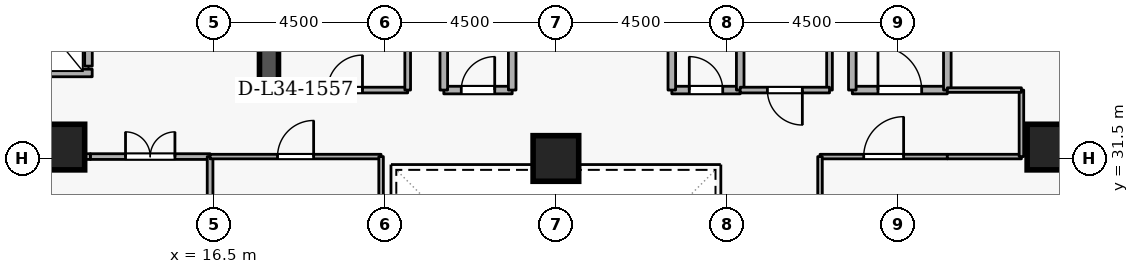
"""IFC4 building model, lengths in metres.
Left out: names, types, materials, properties, quantities, classifications, styles, units other than length and angle.
Written with IfcOpenShell. Run it as: python <this file> out.ifc"""

import sys

from ifc_helpers import new_model, si_unit, direction, frame, frame_2d, origin, origin_2d, place, context, subcontext, project, spatial, rectangle, extrude, element, fill, save


model = new_model("IFC4")
c1 = context("Model", 3, precision=1e-05, world=origin(), true_north=direction((0.0, 1.0)))
c2 = subcontext(c1, "Body", "Model", "MODEL_VIEW")
j1 = project(units=[si_unit("LENGTHUNIT", "METRE"), si_unit("PLANEANGLEUNIT", "RADIAN")], contexts=[c1])
p1 = place(None, origin())
s1 = spatial("IfcSite", under=j1, at=p1, CompositionType="ELEMENT")
p2 = place(p1, origin())
s2 = spatial("IfcBuilding", under=s1, at=p2, CompositionType="ELEMENT")
p3 = place(p2, frame((0.0, 0.0, 130.5)))
s3 = spatial("IfcBuildingStorey", under=s2, at=p3, CompositionType="ELEMENT", Elevation=130.5)
p4 = place(p3, frame((17.95, 33.1, 0.0), z_axis=(0.0, 0.0, 1.0), x_axis=(0.0, 1.0, 0.0)))
e1 = element("IfcWall", 1, at=p4, inside=s3, PredefinedType="SHEAR", context=c2, shape_type="SweptSolid", body=[
    extrude(rectangle(XDim=5.8, YDim=0.5, at=frame_2d((2.9, 0.0))), origin(), (0.0, 0.0, 1.0), 3.6),
])
for number, where, z_axis, x_axis in (
    (2, (12.5, 31.8, 0.0), (0.0, 0.0, 1.0), (1.0, 0.0, 0.0)),
    (3, (38.5, 31.8, 0.0), (0.0, 0.0, 1.0), (1.0, 0.0, 0.0)),
    (4, (25.5, 31.5, 0.0), (0.0, 0.0, 1.0), (1.0, 0.0, 0.0)),
):
    element("IfcColumn", number, at=place(p3, frame(where, z_axis=z_axis, x_axis=x_axis)), inside=s3, PredefinedType="COLUMN", context=c2, shape_type="SweptSolid", body=[
        extrude(rectangle(XDim=1.2, YDim=1.2, at=origin_2d()), origin(), (0.0, 0.0, 1.0), 3.6),
    ])
p5 = place(p3, frame((13.2, 33.93, 0.0), z_axis=(0.0, 0.0, 1.0), x_axis=(0.0, 1.0, 0.0)))
e5 = element("IfcWall", 5, at=p5, inside=s3, PredefinedType="STANDARD", context=c2, shape_type="SweptSolid", body=[
    extrude(rectangle(XDim=1.94, YDim=0.2, at=frame_2d((0.97, 0.0))), origin(), (0.0, 0.0, 1.0), 3.34),
])
p6 = place(p5, frame((0.46, 0.0, 0.0)))
e6 = element("IfcOpeningElement", 6, at=p6, cuts=e5, PredefinedType="OPENING", context=c2, shape_type="SweptSolid", body=[
    extrude(rectangle(XDim=1.02, YDim=2.06, at=frame_2d((0.51, 1.03))), frame((0.0, 0.11, 0.0), z_axis=(0.0, -1.0, 0.0), x_axis=(1.0, 0.0, 0.0)), (0.0, 0.0, 1.0), 0.22),
])
p7 = place(p3, frame((11.002, 33.75, 0.0), z_axis=(0.0, 0.0, 1.0), x_axis=(1.0, 0.0, 0.0)))
e7 = element("IfcWall", 7, at=p7, inside=s3, PredefinedType="STANDARD", context=c2, shape_type="SweptSolid", body=[
    extrude(rectangle(XDim=2.296, YDim=0.2, at=frame_2d((1.148, 0.0))), origin(), (0.0, 0.0, 1.0), 3.34),
])
p8 = place(p3, frame((33.3, 33.3, 0.0), z_axis=(0.0, 0.0, 1.0), x_axis=(1.0, 0.0, 0.0)))
e8 = element("IfcWall", 8, at=p8, inside=s3, PredefinedType="STANDARD", context=c2, shape_type="SweptSolid", body=[
    extrude(rectangle(XDim=2.5, YDim=0.2, at=frame_2d((1.25, 0.0))), origin(), (0.0, 0.0, 1.0), 3.34),
])
p9 = place(p8, frame((0.675, 0.0, 0.0)))
e9 = element("IfcOpeningElement", 9, at=p9, cuts=e8, PredefinedType="OPENING", context=c2, shape_type="SweptSolid", body=[
    extrude(rectangle(XDim=1.15, YDim=2.1, at=frame_2d((0.575, 1.05))), frame((0.0, 0.11, 0.0), z_axis=(0.0, -1.0, 0.0), x_axis=(1.0, 0.0, 0.0)), (0.0, 0.0, 1.0), 0.22),
])
p10 = place(p3, frame((35.8, 33.3, 0.0), z_axis=(0.0, 0.0, 1.0), x_axis=(0.0, 1.0, 0.0)))
e10 = element("IfcWall", 10, at=p10, inside=s3, PredefinedType="STANDARD", context=c2, shape_type="SweptSolid", body=[
    extrude(rectangle(XDim=5.7, YDim=0.2, at=frame_2d((2.85, 0.0))), origin(), (0.0, 0.0, 1.0), 3.34),
])
p11 = place(p3, frame((33.3, 35.6, 0.0), z_axis=(0.0, 0.0, 1.0), x_axis=(0.0, -1.0, 0.0)))
e11 = element("IfcWall", 11, at=p11, inside=s3, PredefinedType="STANDARD", context=c2, shape_type="SweptSolid", body=[
    extrude(rectangle(XDim=2.3, YDim=0.2, at=frame_2d((1.15, 0.0))), origin(), (0.0, 0.0, 1.0), 2.545),
])
p12 = place(p3, frame((22.55, 33.3, 0.0), z_axis=(0.0, 0.0, 1.0), x_axis=(1.0, 0.0, 0.0)))
e12 = element("IfcWall", 12, at=p12, inside=s3, PredefinedType="STANDARD", context=c2, shape_type="SweptSolid", body=[
    extrude(rectangle(XDim=1.8, YDim=0.2, at=frame_2d((0.9, 0.0))), origin(), (0.0, 0.0, 1.0), 3.34),
])
p13 = place(p12, frame((0.46, 0.0, 0.0)))
e13 = element("IfcOpeningElement", 13, at=p13, cuts=e12, PredefinedType="OPENING", context=c2, shape_type="SweptSolid", body=[
    extrude(rectangle(XDim=0.88, YDim=2.04, at=frame_2d((0.44, 1.02))), frame((0.0, 0.11, 0.0), z_axis=(0.0, -1.0, 0.0), x_axis=(1.0, 0.0, 0.0)), (0.0, 0.0, 1.0), 0.22),
])
for number, where, z_axis, x_axis in (
    (14, (24.35, 33.3, 0.0), (0.0, 0.0, 1.0), (0.0, 1.0, 0.0)),
    (15, (22.55, 35.35, 0.0), (0.0, 0.0, 1.0), (0.0, -1.0, 0.0)),
):
    element("IfcWall", number, at=place(p3, frame(where, z_axis=z_axis, x_axis=x_axis)), inside=s3, PredefinedType="STANDARD", context=c2, shape_type="SweptSolid", body=[
        extrude(rectangle(XDim=2.05, YDim=0.2, at=frame_2d((1.025, 0.0))), origin(), (0.0, 0.0, 1.0), 3.34),
    ])
p14 = place(p3, frame((28.55, 33.3, 0.0), z_axis=(0.0, 0.0, 1.0), x_axis=(1.0, 0.0, 0.0)))
e16 = element("IfcWall", 16, at=p14, inside=s3, PredefinedType="STANDARD", context=c2, shape_type="SweptSolid", body=[
    extrude(rectangle(XDim=1.8, YDim=0.2, at=frame_2d((0.9, 0.0))), origin(), (0.0, 0.0, 1.0), 3.34),
])
p15 = place(p14, frame((0.46, 0.0, 0.0)))
e17 = element("IfcOpeningElement", 17, at=p15, cuts=e16, PredefinedType="OPENING", context=c2, shape_type="SweptSolid", body=[
    extrude(rectangle(XDim=0.88, YDim=2.04, at=frame_2d((0.44, 1.02))), frame((0.0, 0.11, 0.0), z_axis=(0.0, -1.0, 0.0), x_axis=(1.0, 0.0, 0.0)), (0.0, 0.0, 1.0), 0.22),
])
for number, where, z_axis, x_axis in (
    (18, (30.35, 33.3, 0.0), (0.0, 0.0, 1.0), (0.0, 1.0, 0.0)),
    (19, (28.55, 35.35, 0.0), (0.0, 0.0, 1.0), (0.0, -1.0, 0.0)),
):
    element("IfcWall", number, at=place(p3, frame(where, z_axis=z_axis, x_axis=x_axis)), inside=s3, PredefinedType="STANDARD", context=c2, shape_type="SweptSolid", body=[
        extrude(rectangle(XDim=2.05, YDim=0.2, at=frame_2d((1.025, 0.0))), origin(), (0.0, 0.0, 1.0), 3.34),
    ])
p16 = place(p3, frame((18.3, 33.3, 0.0), z_axis=(0.0, 0.0, 1.0), x_axis=(1.0, 0.0, 0.0)))
e20 = element("IfcWall", 20, at=p16, inside=s3, PredefinedType="PARTITIONING", context=c2, shape_type="SweptSolid", body=[
    extrude(rectangle(XDim=3.3, YDim=0.15, at=frame_2d((1.65, 0.0))), origin(), (0.0, 0.0, 1.0), 3.34),
])
p17 = place(p16, frame((1.19, 0.0, 0.0)))
e21 = element("IfcOpeningElement", 21, at=p17, cuts=e20, PredefinedType="OPENING", context=c2, shape_type="SweptSolid", body=[
    extrude(rectangle(XDim=0.92, YDim=2.08, at=frame_2d((0.46, 1.04))), frame((0.0, 0.085, 0.0), z_axis=(0.0, -1.0, 0.0), x_axis=(1.0, 0.0, 0.0)), (0.0, 0.0, 1.0), 0.17),
])
p18 = place(p3, frame((21.6, 33.3, 0.0), z_axis=(0.0, 0.0, 1.0), x_axis=(0.0, 1.0, 0.0)))
e22 = element("IfcWall", 22, at=p18, inside=s3, PredefinedType="PARTITIONING", context=c2, shape_type="SweptSolid", body=[
    extrude(rectangle(XDim=2.05, YDim=0.15, at=frame_2d((1.025, 0.0))), origin(), (0.0, 0.0, 1.0), 3.34),
])
p19 = place(p3, frame((32.7, 35.35, 0.0), z_axis=(0.0, 0.0, 1.0), x_axis=(0.0, -1.0, 0.0)))
e23 = element("IfcWall", 23, at=p19, inside=s3, PredefinedType="PARTITIONING", context=c2, shape_type="SweptSolid", body=[
    extrude(rectangle(XDim=2.05, YDim=0.15, at=frame_2d((1.025, 0.0))), origin(), (0.0, 0.0, 1.0), 2.545),
])
p20 = place(p3, frame((32.7, 33.3, 0.0), z_axis=(0.0, 0.0, 1.0), x_axis=(-1.0, 0.0, 0.0)))
e24 = element("IfcWall", 24, at=p20, inside=s3, PredefinedType="PARTITIONING", context=c2, shape_type="SweptSolid", body=[
    extrude(rectangle(XDim=2.35, YDim=0.15, at=frame_2d((1.175, 0.0))), origin(), (0.0, 0.0, 1.0), 3.34),
])
p21 = place(p20, frame((0.715, 0.0, 0.0)))
e25 = element("IfcOpeningElement", 25, at=p21, cuts=e24, PredefinedType="OPENING", context=c2, shape_type="SweptSolid", body=[
    extrude(rectangle(XDim=0.92, YDim=2.08, at=frame_2d((0.46, 1.04))), frame((0.0, 0.085, 0.0), z_axis=(0.0, -1.0, 0.0), x_axis=(1.0, 0.0, 0.0)), (0.0, 0.0, 1.0), 0.17),
])
p22 = place(p3, frame((13.25, 31.55, 0.0), z_axis=(0.0, 0.0, 1.0), x_axis=(1.0, 0.0, 0.0)))
e26 = element("IfcWall", 26, at=p22, inside=s3, PredefinedType="PARTITIONING", context=c2, shape_type="SweptSolid", body=[
    extrude(rectangle(XDim=3.15, YDim=0.15, at=frame_2d((1.575, 0.0))), origin(), (0.0, 0.0, 1.0), 3.34),
])
p23 = place(p22, frame((0.925, 0.0, 0.0)))
e27 = element("IfcOpeningElement", 27, at=p23, cuts=e26, PredefinedType="OPENING", context=c2, shape_type="SweptSolid", body=[
    extrude(rectangle(XDim=1.3, YDim=2.12, at=frame_2d((0.65, 1.06))), frame((0.0, 0.085, 0.0), z_axis=(0.0, -1.0, 0.0), x_axis=(1.0, 0.0, 0.0)), (0.0, 0.0, 1.0), 0.17),
])
p24 = place(p3, frame((16.4, 31.55, 0.0), z_axis=(0.0, 0.0, 1.0), x_axis=(0.0, -1.0, 0.0)))
e28 = element("IfcWall", 28, at=p24, inside=s3, PredefinedType="PARTITIONING", context=c2, shape_type="SweptSolid", body=[
    extrude(rectangle(XDim=4.55, YDim=0.15, at=frame_2d((2.275, 0.0))), origin(), (0.0, 0.0, 1.0), 3.34),
])
p25 = place(p3, frame((10.9, 31.55, 0.0), z_axis=(0.0, 0.0, 1.0), x_axis=(1.0, 0.0, 0.0)))
e29 = element("IfcWall", 29, at=p25, inside=s3, PredefinedType="PARTITIONING", context=c2, shape_type="SweptSolid", body=[
    extrude(rectangle(XDim=2.35, YDim=0.15, at=frame_2d((1.175, 0.0))), origin(), (0.0, 0.0, 1.0), 3.34),
])
p26 = place(p3, frame((16.4, 31.55, 0.0), z_axis=(0.0, 0.0, 1.0), x_axis=(1.0, 0.0, 0.0)))
e30 = element("IfcWall", 30, at=p26, inside=s3, PredefinedType="PARTITIONING", context=c2, shape_type="SweptSolid", body=[
    extrude(rectangle(XDim=4.5, YDim=0.12, at=frame_2d((2.25, 0.0))), origin(), (0.0, 0.0, 1.0), 3.34),
])
p27 = place(p26, frame((1.775, 0.0, 0.0)))
e31 = element("IfcOpeningElement", 31, at=p27, cuts=e30, PredefinedType="OPENING", context=c2, shape_type="SweptSolid", body=[
    extrude(rectangle(XDim=0.95, YDim=2.1, at=frame_2d((0.475, 1.05))), frame((0.0, 0.07, 0.0), z_axis=(0.0, -1.0, 0.0), x_axis=(1.0, 0.0, 0.0)), (0.0, 0.0, 1.0), 0.14),
])
p28 = place(p3, frame((20.9, 31.55, 0.0), z_axis=(0.0, 0.0, 1.0), x_axis=(0.0, -1.0, 0.0)))
e32 = element("IfcWall", 32, at=p28, inside=s3, PredefinedType="PARTITIONING", context=c2, shape_type="SweptSolid", body=[
    extrude(rectangle(XDim=9.1, YDim=0.12, at=frame_2d((4.55, 0.0))), origin(), (0.0, 0.0, 1.0), 3.34),
])
p29 = place(p3, frame((32.45, 31.55, 0.0), z_axis=(0.0, 0.0, 1.0), x_axis=(1.0, 0.0, 0.0)))
e33 = element("IfcWall", 33, at=p29, inside=s3, PredefinedType="PARTITIONING", context=c2, shape_type="SweptSolid", body=[
    extrude(rectangle(XDim=3.35, YDim=0.12, at=frame_2d((1.675, 0.0))), origin(), (0.0, 0.0, 1.0), 3.34),
])
p30 = place(p29, frame((1.15, 0.0, 0.0)))
e34 = element("IfcOpeningElement", 34, at=p30, cuts=e33, PredefinedType="OPENING", context=c2, shape_type="SweptSolid", body=[
    extrude(rectangle(XDim=1.05, YDim=2.1, at=frame_2d((0.525, 1.05))), frame((0.0, 0.07, 0.0), z_axis=(0.0, -1.0, 0.0), x_axis=(1.0, 0.0, 0.0)), (0.0, 0.0, 1.0), 0.14),
])
p31 = place(p3, frame((35.8, 31.55, 0.0), z_axis=(0.0, 0.0, 1.0), x_axis=(1.0, 0.0, 0.0)))
e35 = element("IfcWall", 35, at=p31, inside=s3, PredefinedType="PARTITIONING", context=c2, shape_type="SweptSolid", body=[
    extrude(rectangle(XDim=1.95, YDim=0.12, at=frame_2d((0.975, 0.0))), origin(), (0.0, 0.0, 1.0), 3.34),
])
p32 = place(p3, frame((37.75, 31.55, 0.0), z_axis=(0.0, 0.0, 1.0), x_axis=(0.0, 1.0, 0.0)))
e36 = element("IfcWall", 36, at=p32, inside=s3, PredefinedType="PARTITIONING", context=c2, shape_type="SweptSolid", body=[
    extrude(rectangle(XDim=1.75, YDim=0.12, at=frame_2d((0.875, 0.0))), origin(), (0.0, 0.0, 1.0), 3.34),
])
p33 = place(p3, frame((37.75, 33.3, 0.0), z_axis=(0.0, 0.0, 1.0), x_axis=(-1.0, 0.0, 0.0)))
e37 = element("IfcWall", 37, at=p33, inside=s3, PredefinedType="PARTITIONING", context=c2, shape_type="SweptSolid", body=[
    extrude(rectangle(XDim=1.95, YDim=0.12, at=frame_2d((0.975, 0.0))), origin(), (0.0, 0.0, 1.0), 3.34),
])
p34 = place(p3, frame((32.45, 29.25, 0.0), z_axis=(0.0, 0.0, 1.0), x_axis=(0.0, 1.0, 0.0)))
e38 = element("IfcWall", 38, at=p34, inside=s3, PredefinedType="PARTITIONING", context=c2, shape_type="SweptSolid", body=[
    extrude(rectangle(XDim=2.3, YDim=0.12, at=frame_2d((1.15, 0.0))), origin(), (0.0, 0.0, 1.0), 3.34),
])
p35 = place(p9, origin())
e39 = element("IfcDoor", 39, at=p35, inside=s3, OperationType="SINGLE_SWING_LEFT", PredefinedType="DOOR", context=c2, shape_type="SweptSolid", body=[
    extrude(rectangle(XDim=1.15, YDim=2.1, at=frame_2d((0.575, 1.05))), frame((0.0, 0.025, 0.0), z_axis=(0.0, -1.0, 0.0), x_axis=(1.0, 0.0, 0.0)), (0.0, 0.0, 1.0), 0.05),
])
fill(e9, e39)
p36 = place(p13, origin())
e40 = element("IfcDoor", 40, at=p36, inside=s3, OperationType="SINGLE_SWING_RIGHT", PredefinedType="DOOR", context=c2, shape_type="SweptSolid", body=[
    extrude(rectangle(XDim=0.88, YDim=2.04, at=frame_2d((0.44, 1.02))), frame((0.0, 0.025, 0.0), z_axis=(0.0, -1.0, 0.0), x_axis=(1.0, 0.0, 0.0)), (0.0, 0.0, 1.0), 0.05),
])
fill(e13, e40)
p37 = place(p15, origin())
e41 = element("IfcDoor", 41, at=p37, inside=s3, OperationType="SINGLE_SWING_LEFT", PredefinedType="DOOR", context=c2, shape_type="SweptSolid", body=[
    extrude(rectangle(XDim=0.88, YDim=2.04, at=frame_2d((0.44, 1.02))), frame((0.0, 0.025, 0.0), z_axis=(0.0, -1.0, 0.0), x_axis=(1.0, 0.0, 0.0)), (0.0, 0.0, 1.0), 0.05),
])
fill(e17, e41)
p38 = place(p17, origin())
e42 = element("IfcDoor", 42, at=p38, inside=s3, OperationType="SINGLE_SWING_RIGHT", PredefinedType="DOOR", context=c2, shape_type="SweptSolid", body=[
    extrude(rectangle(XDim=0.92, YDim=2.08, at=frame_2d((0.46, 1.04))), frame((0.0, 0.025, 0.0), z_axis=(0.0, -1.0, 0.0), x_axis=(1.0, 0.0, 0.0)), (0.0, 0.0, 1.0), 0.05),
])
fill(e21, e42)
p39 = place(p21, origin())
e43 = element("IfcDoor", 43, at=p39, inside=s3, OperationType="SINGLE_SWING_LEFT", PredefinedType="DOOR", context=c2, shape_type="SweptSolid", body=[
    extrude(rectangle(XDim=0.92, YDim=2.08, at=frame_2d((0.46, 1.04))), frame((0.0, 0.025, 0.0), z_axis=(0.0, -1.0, 0.0), x_axis=(1.0, 0.0, 0.0)), (0.0, 0.0, 1.0), 0.05),
])
fill(e25, e43)
p40 = place(p23, origin())
e44 = element("IfcDoor", 44, at=p40, inside=s3, OperationType="DOUBLE_DOOR_SINGLE_SWING", PredefinedType="DOOR", context=c2, shape_type="SweptSolid", body=[
    extrude(rectangle(XDim=1.3, YDim=2.12, at=frame_2d((0.65, 1.06))), frame((0.0, 0.025, 0.0), z_axis=(0.0, -1.0, 0.0), x_axis=(1.0, 0.0, 0.0)), (0.0, 0.0, 1.0), 0.05),
])
fill(e27, e44)
p41 = place(p27, origin())
e45 = element("IfcDoor", 45, at=p41, inside=s3, OperationType="SINGLE_SWING_RIGHT", PredefinedType="DOOR", context=c2, shape_type="SweptSolid", body=[
    extrude(rectangle(XDim=0.95, YDim=2.1, at=frame_2d((0.475, 1.05))), frame((0.0, 0.025, 0.0), z_axis=(0.0, -1.0, 0.0), x_axis=(1.0, 0.0, 0.0)), (0.0, 0.0, 1.0), 0.05),
])
fill(e31, e45)
p42 = place(p30, origin())
e46 = element("IfcDoor", 46, at=p42, inside=s3, OperationType="SINGLE_SWING_RIGHT", PredefinedType="DOOR", context=c2, shape_type="SweptSolid", body=[
    extrude(rectangle(XDim=1.05, YDim=2.1, at=frame_2d((0.525, 1.05))), frame((0.0, 0.025, 0.0), z_axis=(0.0, -1.0, 0.0), x_axis=(1.0, 0.0, 0.0)), (0.0, 0.0, 1.0), 0.05),
])
fill(e34, e46)
save(model, sys.argv[1])
